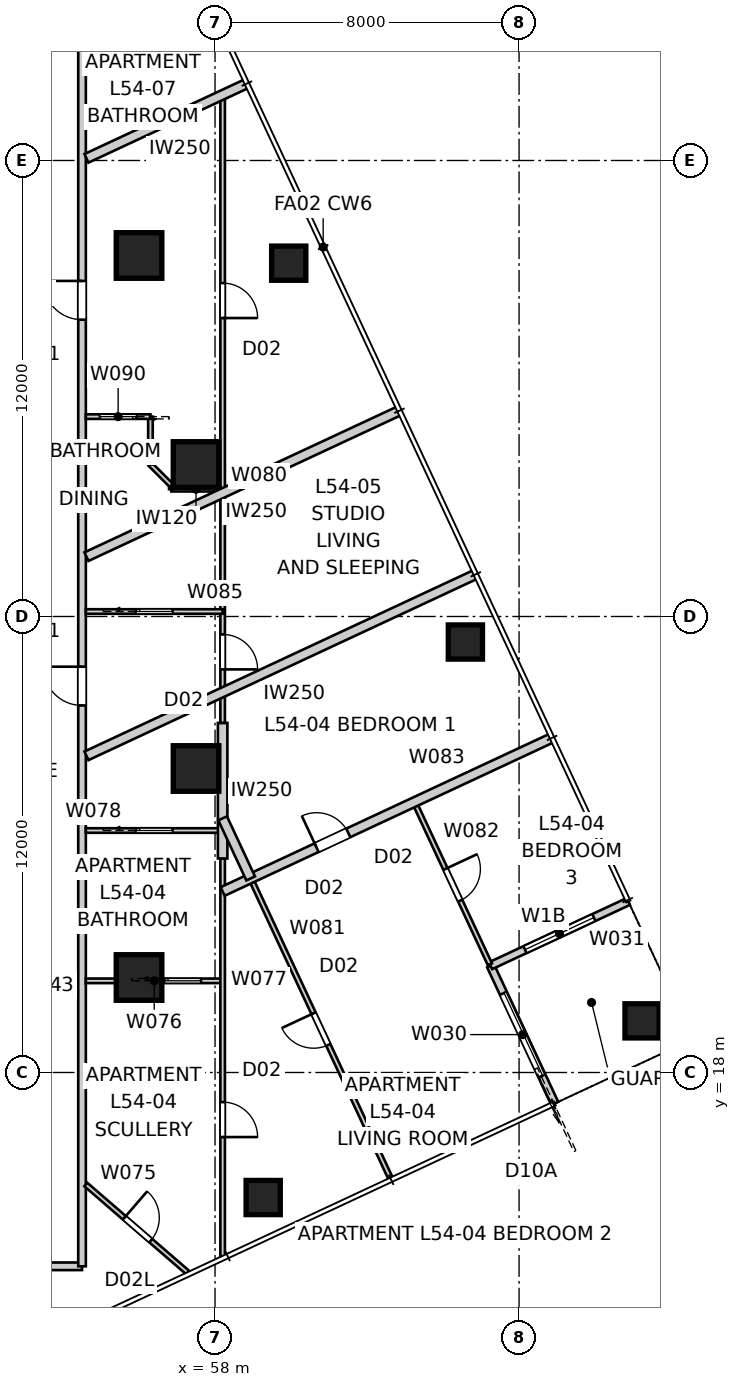
"""IFC4 building model, lengths in metres.
Left out: names, types, materials, properties, quantities, classifications, styles, units other than length and angle.
Written with IfcOpenShell. Run it as: python <this file> out.ifc"""

import sys

from ifc_helpers import new_model, si_unit, direction, frame, frame_2d, origin, origin_2d, place, context, subcontext, project, spatial, rectangle, extrude, element, fill, save


model = new_model("IFC4")
c1 = context("Model", 3, precision=1e-05, world=origin(), true_north=direction((0.0, 1.0)))
c2 = subcontext(c1, "Body", "Model", "MODEL_VIEW")
j1 = project(units=[si_unit("LENGTHUNIT", "METRE"), si_unit("PLANEANGLEUNIT", "RADIAN")], contexts=[c1])
p1 = place(None, origin())
s1 = spatial("IfcSite", under=j1, at=p1, CompositionType="ELEMENT")
p2 = place(p1, origin())
s2 = spatial("IfcBuilding", under=s1, at=p2, CompositionType="ELEMENT")
p3 = place(p2, frame((0.0, 0.0, 196.4)))
s3 = spatial("IfcBuildingStorey", under=s2, at=p3, CompositionType="ELEMENT", Elevation=196.4)
for number, where, z_axis, x_axis in (
    (1, (59.267, 14.71, 0.0), (0.0, 0.0, 1.0), (1.0, 0.0, 0.0)),
    (2, (69.236, 19.359, 0.0), (0.0, 0.0, 1.0), (1.0, 0.0, 0.0)),
    (3, (64.588, 29.328, 0.0), (0.0, 0.0, 1.0), (1.0, 0.0, 0.0)),
    (4, (59.939, 39.298, 0.0), (0.0, 0.0, 1.0), (1.0, 0.0, 0.0)),
):
    element("IfcColumn", number, at=place(p3, frame(where, z_axis=z_axis, x_axis=x_axis)), inside=s3, PredefinedType="COLUMN", context=c2, shape_type="SweptSolid", body=[
        extrude(rectangle(XDim=0.9, YDim=0.9, at=origin_2d()), origin(), (0.0, 0.0, 1.0), 3.4),
    ])
for number, where, z_axis, x_axis in (
    (5, (57.5, 26.0, 0.0), (0.0, 0.0, 1.0), (1.0, 0.0, 0.0)),
    (6, (57.5, 34.0, 0.0), (0.0, 0.0, 1.0), (1.0, 0.0, 0.0)),
    (7, (56.0, 39.5, 0.0), (0.0, 0.0, 1.0), (1.0, 0.0, 0.0)),
    (8, (56.0, 20.5, 0.0), (0.0, 0.0, 1.0), (1.0, 0.0, 0.0)),
):
    element("IfcColumn", number, at=place(p3, frame(where, z_axis=z_axis, x_axis=x_axis)), inside=s3, PredefinedType="COLUMN", context=c2, shape_type="SweptSolid", body=[
        extrude(rectangle(XDim=1.2, YDim=1.2, at=origin_2d()), origin(), (0.0, 0.0, 1.0), 3.4),
    ])
p4 = place(p3, frame((66.94, 17.185, 0.0), z_axis=(0.0, 0.0, 1.0), x_axis=(-0.422658246362, 0.906289140828, 0.0)))
e9 = element("IfcWall", 9, at=p4, inside=s3, PredefinedType="SOLIDWALL", context=c2, shape_type="SweptSolid", body=[
    extrude(rectangle(XDim=4.0, YDim=0.2, at=frame_2d((2.0, 0.0))), origin(), (0.0, 0.0, 1.0), 3.25),
])
p5 = place(p4, frame((0.8, 0.0, 0.0)))
e10 = element("IfcOpeningElement", 10, at=p5, cuts=e9, PredefinedType="OPENING", context=c2, shape_type="SweptSolid", body=[
    extrude(rectangle(XDim=2.4, YDim=2.1, at=frame_2d((1.2, 1.05))), frame((0.0, 0.11, 0.0), z_axis=(0.0, -1.0, 0.0), x_axis=(1.0, 0.0, 0.0)), (0.0, 0.0, 1.0), 0.22),
])
p6 = place(p3, frame((65.25, 20.81, 0.0), z_axis=(0.0, 0.0, 1.0), x_axis=(0.906289140828, 0.422658246362, 0.0)))
e11 = element("IfcWall", 11, at=p6, inside=s3, PredefinedType="SOLIDWALL", context=c2, shape_type="SweptSolid", body=[
    extrude(rectangle(XDim=4.0, YDim=0.2, at=frame_2d((2.0, 0.0))), origin(), (0.0, 0.0, 1.0), 3.25),
])
p7 = place(p6, frame((1.0, 0.0, 0.45)))
e12 = element("IfcOpeningElement", 12, at=p7, cuts=e11, PredefinedType="OPENING", context=c2, shape_type="SweptSolid", body=[
    extrude(rectangle(XDim=2.0, YDim=1.8, at=frame_2d((1.0, 0.9))), frame((0.0, 0.11, 0.0), z_axis=(0.0, -1.0, 0.0), x_axis=(1.0, 0.0, 0.0)), (0.0, 0.0, 1.0), 0.22),
])
p8 = place(p3, frame((46.308, 12.9, 0.0), z_axis=(0.0, 0.0, 1.0), x_axis=(1.0, 0.0, 0.0)))
e13 = element("IfcWall", 13, at=p8, inside=s3, PredefinedType="PARTITIONING", context=c2, shape_type="SweptSolid", body=[
    extrude(rectangle(XDim=8.192, YDim=0.2, at=frame_2d((4.096, 0.0))), origin(), (0.0, 0.0, 1.0), 3.25),
])
p9 = place(p8, frame((4.207, 0.0, 0.0)))
e14 = element("IfcOpeningElement", 14, at=p9, cuts=e13, PredefinedType="OPENING", context=c2, shape_type="SweptSolid", body=[
    extrude(rectangle(XDim=1.02, YDim=2.34, at=frame_2d((0.51, 1.17))), frame((0.0, 0.11, 0.0), z_axis=(0.0, -1.0, 0.0), x_axis=(1.0, 0.0, 0.0)), (0.0, 0.0, 1.0), 0.22),
])
p10 = place(p3, frame((54.5, 12.9, 0.0), z_axis=(0.0, 0.0, 1.0), x_axis=(0.0, 1.0, 0.0)))
e15 = element("IfcWall", 15, at=p10, inside=s3, PredefinedType="PARTITIONING", context=c2, shape_type="SweptSolid", body=[
    extrude(rectangle(XDim=33.8, YDim=0.2, at=frame_2d((16.9, 0.0))), origin(), (0.0, 0.0, 1.0), 3.25),
])
p11 = place(p10, frame((24.911, 0.0, 0.0)))
e16 = element("IfcOpeningElement", 16, at=p11, cuts=e15, PredefinedType="OPENING", context=c2, shape_type="SweptSolid", body=[
    extrude(rectangle(XDim=1.02, YDim=2.34, at=frame_2d((0.51, 1.17))), frame((0.0, 0.11, 0.0), z_axis=(0.0, -1.0, 0.0), x_axis=(1.0, 0.0, 0.0)), (0.0, 0.0, 1.0), 0.22),
])
p12 = place(p10, frame((14.759, 0.0, 0.0)))
e17 = element("IfcOpeningElement", 17, at=p12, cuts=e15, PredefinedType="OPENING", context=c2, shape_type="SweptSolid", body=[
    extrude(rectangle(XDim=1.02, YDim=2.34, at=frame_2d((0.51, 1.17))), frame((0.0, 0.11, 0.0), z_axis=(0.0, -1.0, 0.0), x_axis=(1.0, 0.0, 0.0)), (0.0, 0.0, 1.0), 0.22),
])
p13 = place(p3, frame((62.853, 35.415, 0.0), z_axis=(0.0, 0.0, 1.0), x_axis=(-0.90630664327, -0.422620714548, 0.0)))
e18 = element("IfcWall", 18, at=p13, inside=s3, PredefinedType="PARTITIONING", context=c2, shape_type="SweptSolid", body=[
    extrude(rectangle(XDim=9.088, YDim=0.25, at=frame_2d((4.544, 0.0))), origin(), (0.0, 0.0, 1.0), 3.25),
])
p14 = place(p3, frame((58.838, 44.025, 0.0), z_axis=(0.0, 0.0, 1.0), x_axis=(-0.906317010604, -0.422598481173, 0.0)))
e19 = element("IfcWall", 19, at=p14, inside=s3, PredefinedType="PARTITIONING", context=c2, shape_type="SweptSolid", body=[
    extrude(rectangle(XDim=4.657, YDim=0.25, at=frame_2d((2.329, 0.0))), origin(), (0.0, 0.0, 1.0), 3.25),
])
p15 = place(p3, frame((64.86, 31.11, 0.0), z_axis=(0.0, 0.0, 1.0), x_axis=(-0.906306714884, -0.422620560972, 0.0)))
e20 = element("IfcWall", 20, at=p15, inside=s3, PredefinedType="PARTITIONING", context=c2, shape_type="SweptSolid", body=[
    extrude(rectangle(XDim=11.302, YDim=0.25, at=frame_2d((5.651, 0.0))), origin(), (0.0, 0.0, 1.0), 3.25),
])
p16 = place(p3, frame((54.6, 15.052, 0.0), z_axis=(0.0, 0.0, 1.0), x_axis=(0.756558808476, -0.653925660391, 0.0)))
e21 = element("IfcWall", 21, at=p16, inside=s3, PredefinedType="PARTITIONING", context=c2, shape_type="SweptSolid", body=[
    extrude(rectangle(XDim=3.554, YDim=0.12, at=frame_2d((1.777, 0.0))), origin(), (0.0, 0.0, 1.0), 3.25),
])
p17 = place(p16, frame((1.339, 0.0, 0.0)))
e22 = element("IfcOpeningElement", 22, at=p17, cuts=e21, PredefinedType="OPENING", context=c2, shape_type="SweptSolid", body=[
    extrude(rectangle(XDim=0.92, YDim=2.1, at=frame_2d((0.46, 1.05))), frame((0.0, 0.07, 0.0), z_axis=(0.0, -1.0, 0.0), x_axis=(1.0, 0.0, 0.0)), (0.0, 0.0, 1.0), 0.14),
])
p18 = place(p3, frame((54.6, 20.413, 0.0), z_axis=(0.0, 0.0, 1.0), x_axis=(1.0, 0.0, 0.0)))
e23 = element("IfcWall", 23, at=p18, inside=s3, PredefinedType="PARTITIONING", context=c2, shape_type="SweptSolid", body=[
    extrude(rectangle(XDim=3.6, YDim=0.12, at=frame_2d((1.8, 0.0))), origin(), (0.0, 0.0, 1.0), 3.25),
])
p19 = place(p18, frame((2.07, 0.0, 0.0)))
e24 = element("IfcOpeningElement", 24, at=p19, cuts=e23, PredefinedType="OPENING", context=c2, shape_type="SweptSolid", body=[
    extrude(rectangle(XDim=0.96, YDim=2.1, at=frame_2d((0.48, 1.05))), frame((0.0, 0.07, 0.0), z_axis=(0.0, -1.0, 0.0), x_axis=(1.0, 0.0, 0.0)), (0.0, 0.0, 1.0), 0.14),
])
p20 = place(p3, frame((58.2, 23.632, 0.0), z_axis=(0.0, 0.0, 1.0), x_axis=(0.0, -1.0, 0.0)))
e25 = element("IfcWall", 25, at=p20, inside=s3, PredefinedType="PARTITIONING", context=c2, shape_type="SweptSolid", body=[
    extrude(rectangle(XDim=10.479, YDim=0.12, at=frame_2d((5.24, 0.0))), origin(), (0.0, 0.0, 1.0), 3.25),
])
p21 = place(p20, frame((6.411, 0.0, 0.0)))
e26 = element("IfcOpeningElement", 26, at=p21, cuts=e25, PredefinedType="OPENING", context=c2, shape_type="SweptSolid", body=[
    extrude(rectangle(XDim=0.92, YDim=2.34, at=frame_2d((0.46, 1.17))), frame((0.0, 0.07, 0.0), z_axis=(0.0, -1.0, 0.0), x_axis=(1.0, 0.0, 0.0)), (0.0, 0.0, 1.0), 0.14),
])
p22 = place(p3, frame((54.6, 24.368, 0.0), z_axis=(0.0, 0.0, 1.0), x_axis=(1.0, 0.0, 0.0)))
e27 = element("IfcWall", 27, at=p22, inside=s3, PredefinedType="PARTITIONING", context=c2, shape_type="SweptSolid", body=[
    extrude(rectangle(XDim=3.6, YDim=0.12, at=frame_2d((1.8, 0.0))), origin(), (0.0, 0.0, 1.0), 3.25),
])
p23 = place(p22, frame((1.32, 0.0, 0.0)))
e28 = element("IfcOpeningElement", 28, at=p23, cuts=e27, PredefinedType="OPENING", context=c2, shape_type="SweptSolid", body=[
    extrude(rectangle(XDim=0.96, YDim=2.1, at=frame_2d((0.48, 1.05))), frame((0.0, 0.07, 0.0), z_axis=(0.0, -1.0, 0.0), x_axis=(1.0, 0.0, 0.0)), (0.0, 0.0, 1.0), 0.14),
])
p24 = place(p3, frame((58.2, 27.2, 0.0), z_axis=(0.0, 0.0, 1.0), x_axis=(0.0, -1.0, 0.0)))
e29 = element("IfcWall", 29, at=p24, inside=s3, PredefinedType="PARTITIONING", context=c2, shape_type="SweptSolid", body=[
    extrude(rectangle(XDim=3.568, YDim=0.25, at=frame_2d((1.784, 0.0))), origin(), (0.0, 0.0, 1.0), 3.25),
])
p25 = place(p3, frame((58.2, 43.728, 0.0), z_axis=(0.0, 0.0, 1.0), x_axis=(0.0, -1.0, 0.0)))
e30 = element("IfcWall", 30, at=p25, inside=s3, PredefinedType="PARTITIONING", context=c2, shape_type="SweptSolid", body=[
    extrude(rectangle(XDim=16.528, YDim=0.12, at=frame_2d((8.264, 0.0))), origin(), (0.0, 0.0, 1.0), 3.25),
])
p26 = place(p25, frame((4.954, 0.0, 0.0)))
e31 = element("IfcOpeningElement", 31, at=p26, cuts=e30, PredefinedType="OPENING", context=c2, shape_type="SweptSolid", body=[
    extrude(rectangle(XDim=0.92, YDim=2.34, at=frame_2d((0.46, 1.17))), frame((0.0, 0.07, 0.0), z_axis=(0.0, -1.0, 0.0), x_axis=(1.0, 0.0, 0.0)), (0.0, 0.0, 1.0), 0.14),
])
p27 = place(p25, frame((14.2, 0.0, 0.0)))
e32 = element("IfcOpeningElement", 32, at=p27, cuts=e30, PredefinedType="OPENING", context=c2, shape_type="SweptSolid", body=[
    extrude(rectangle(XDim=0.92, YDim=2.34, at=frame_2d((0.46, 1.17))), frame((0.0, 0.07, 0.0), z_axis=(0.0, -1.0, 0.0), x_axis=(1.0, 0.0, 0.0)), (0.0, 0.0, 1.0), 0.14),
])
p28 = place(p3, frame((62.618, 15.213, 0.0), z_axis=(0.0, 0.0, 1.0), x_axis=(-0.422604635972, 0.906314140712, 0.0)))
e33 = element("IfcWall", 33, at=p28, inside=s3, PredefinedType="PARTITIONING", context=c2, shape_type="SweptSolid", body=[
    extrude(rectangle(XDim=8.71, YDim=0.12, at=frame_2d((4.355, 0.0))), origin(), (0.0, 0.0, 1.0), 3.25),
])
p29 = place(p28, frame((3.875, 0.0, 0.0)))
e34 = element("IfcOpeningElement", 34, at=p29, cuts=e33, PredefinedType="OPENING", context=c2, shape_type="SweptSolid", body=[
    extrude(rectangle(XDim=0.92, YDim=2.34, at=frame_2d((0.46, 1.17))), frame((0.0, 0.07, 0.0), z_axis=(0.0, -1.0, 0.0), x_axis=(1.0, 0.0, 0.0)), (0.0, 0.0, 1.0), 0.14),
])
p30 = place(p3, frame((63.242, 25.115, 0.0), z_axis=(0.0, 0.0, 1.0), x_axis=(0.422601682441, -0.906315517906, 0.0)))
e35 = element("IfcWall", 35, at=p30, inside=s3, PredefinedType="PARTITIONING", context=c2, shape_type="SweptSolid", body=[
    extrude(rectangle(XDim=4.71, YDim=0.12, at=frame_2d((2.355, 0.0))), origin(), (0.0, 0.0, 1.0), 3.25),
])
p31 = place(p30, frame((1.94, 0.0, 0.0)))
e36 = element("IfcOpeningElement", 36, at=p31, cuts=e35, PredefinedType="OPENING", context=c2, shape_type="SweptSolid", body=[
    extrude(rectangle(XDim=0.92, YDim=2.34, at=frame_2d((0.46, 1.17))), frame((0.0, 0.07, 0.0), z_axis=(0.0, -1.0, 0.0), x_axis=(1.0, 0.0, 0.0)), (0.0, 0.0, 1.0), 0.14),
])
p32 = place(p3, frame((58.2, 22.764, 0.0), z_axis=(0.0, 0.0, 1.0), x_axis=(0.906301646474, 0.422631429971, 0.0)))
e37 = element("IfcWall", 37, at=p32, inside=s3, PredefinedType="PARTITIONING", context=c2, shape_type="SweptSolid", body=[
    extrude(rectangle(XDim=9.523, YDim=0.25, at=frame_2d((4.762, 0.0))), origin(), (0.0, 0.0, 1.0), 3.25),
])
p33 = place(p32, frame((2.729, 0.0, 0.0)))
e38 = element("IfcOpeningElement", 38, at=p33, cuts=e37, PredefinedType="OPENING", context=c2, shape_type="SweptSolid", body=[
    extrude(rectangle(XDim=0.92, YDim=2.34, at=frame_2d((0.46, 1.17))), frame((0.0, 0.135, 0.0), z_axis=(0.0, -1.0, 0.0), x_axis=(1.0, 0.0, 0.0)), (0.0, 0.0, 1.0), 0.27),
])
p34 = place(p3, frame((58.937, 23.107, 0.0), z_axis=(0.0, 0.0, 1.0), x_axis=(-0.422640287026, 0.906297516152, 0.0)))
e39 = element("IfcWall", 39, at=p34, inside=s3, PredefinedType="PARTITIONING", context=c2, shape_type="SweptSolid", body=[
    extrude(rectangle(XDim=1.745, YDim=0.25, at=frame_2d((0.872, 0.0))), origin(), (0.0, 0.0, 1.0), 3.25),
])
p35 = place(p3, frame((54.6, 30.131, 0.0), z_axis=(0.0, 0.0, 1.0), x_axis=(1.0, 0.0, 0.0)))
e40 = element("IfcWall", 40, at=p35, inside=s3, PredefinedType="PARTITIONING", context=c2, shape_type="SweptSolid", body=[
    extrude(rectangle(XDim=3.6, YDim=0.12, at=frame_2d((1.8, 0.0))), origin(), (0.0, 0.0, 1.0), 3.25),
])
p36 = place(p35, frame((1.32, 0.0, 0.0)))
e41 = element("IfcOpeningElement", 41, at=p36, cuts=e40, PredefinedType="OPENING", context=c2, shape_type="SweptSolid", body=[
    extrude(rectangle(XDim=0.96, YDim=2.1, at=frame_2d((0.48, 1.05))), frame((0.0, 0.07, 0.0), z_axis=(0.0, -1.0, 0.0), x_axis=(1.0, 0.0, 0.0)), (0.0, 0.0, 1.0), 0.14),
])
p37 = place(p3, frame((58.15, 33.35, 0.0), z_axis=(0.0, 0.0, 1.0), x_axis=(-1.0, 0.0, 0.0)))
e42 = element("IfcWall", 42, at=p37, inside=s3, PredefinedType="PARTITIONING", context=c2, shape_type="SweptSolid", body=[
    extrude(rectangle(XDim=1.3, YDim=0.12, at=frame_2d((0.65, 0.0))), origin(), (0.0, 0.0, 1.0), 3.25),
])
p38 = place(p3, frame((56.85, 33.45, 0.0), z_axis=(0.0, 0.0, 1.0), x_axis=(-0.707106781187, 0.707106781187, 0.0)))
e43 = element("IfcWall", 43, at=p38, inside=s3, PredefinedType="PARTITIONING", context=c2, shape_type="SweptSolid", body=[
    extrude(rectangle(XDim=0.778, YDim=0.12, at=frame_2d((0.389, 0.0))), origin(), (0.0, 0.0, 1.0), 3.25),
])
p39 = place(p3, frame((56.3, 34.0, 0.0), z_axis=(0.0, 0.0, 1.0), x_axis=(0.0, 1.0, 0.0)))
e44 = element("IfcWall", 44, at=p39, inside=s3, PredefinedType="PARTITIONING", context=c2, shape_type="SweptSolid", body=[
    extrude(rectangle(XDim=1.26, YDim=0.12, at=frame_2d((0.63, 0.0))), origin(), (0.0, 0.0, 1.0), 3.25),
])
p40 = place(p3, frame((56.3, 35.26, 0.0), z_axis=(0.0, 0.0, 1.0), x_axis=(-1.0, 0.0, 0.0)))
e45 = element("IfcWall", 45, at=p40, inside=s3, PredefinedType="PARTITIONING", context=c2, shape_type="SweptSolid", body=[
    extrude(rectangle(XDim=1.7, YDim=0.12, at=frame_2d((0.85, 0.0))), origin(), (0.0, 0.0, 1.0), 3.25),
])
p41 = place(p40, frame((0.37, 0.0, 0.0)))
e46 = element("IfcOpeningElement", 46, at=p41, cuts=e45, PredefinedType="OPENING", context=c2, shape_type="SweptSolid", body=[
    extrude(rectangle(XDim=0.96, YDim=2.1, at=frame_2d((0.48, 1.05))), frame((0.0, 0.07, 0.0), z_axis=(0.0, -1.0, 0.0), x_axis=(1.0, 0.0, 0.0)), (0.0, 0.0, 1.0), 0.14),
])
p42 = place(p3, frame((56.85, 33.35, 0.0), z_axis=(0.0, 0.0, 1.0), x_axis=(0.0, 1.0, 0.0)))
e47 = element("IfcWall", 47, at=p42, inside=s3, PredefinedType="PARTITIONING", context=c2, shape_type="SweptSolid", body=[
    extrude(rectangle(XDim=0.1, YDim=0.12, at=frame_2d((0.05, 0.0))), origin(), (0.0, 0.0, 1.0), 3.25),
])
p43 = place(p5, origin())
e48 = element("IfcDoor", 48, at=p43, inside=s3, OperationType="SLIDING_TO_LEFT", PredefinedType="DOOR", context=c2, shape_type="SweptSolid", body=[
    extrude(rectangle(XDim=2.4, YDim=2.1, at=frame_2d((1.2, 1.05))), frame((0.0, 0.025, 0.0), z_axis=(0.0, -1.0, 0.0), x_axis=(1.0, 0.0, 0.0)), (0.0, 0.0, 1.0), 0.05),
])
fill(e10, e48)
p44 = place(p7, origin())
e49 = element("IfcWindow", 49, at=p44, inside=s3, PartitioningType="SINGLE_PANEL", PredefinedType="WINDOW", context=c2, shape_type="SweptSolid", body=[
    extrude(rectangle(XDim=2.0, YDim=1.8, at=frame_2d((1.0, 0.9))), frame((0.0, 0.03, 0.0), z_axis=(0.0, -1.0, 0.0), x_axis=(1.0, 0.0, 0.0)), (0.0, 0.0, 1.0), 0.06),
])
fill(e12, e49)
p45 = place(p11, origin())
e50 = element("IfcDoor", 50, at=p45, inside=s3, OperationType="SINGLE_SWING_RIGHT", PredefinedType="DOOR", context=c2, shape_type="SweptSolid", body=[
    extrude(rectangle(XDim=1.02, YDim=2.34, at=frame_2d((0.51, 1.17))), frame((0.0, 0.025, 0.0), z_axis=(0.0, -1.0, 0.0), x_axis=(1.0, 0.0, 0.0)), (0.0, 0.0, 1.0), 0.05),
])
fill(e16, e50)
p46 = place(p12, origin())
e51 = element("IfcDoor", 51, at=p46, inside=s3, OperationType="SINGLE_SWING_RIGHT", PredefinedType="DOOR", context=c2, shape_type="SweptSolid", body=[
    extrude(rectangle(XDim=1.02, YDim=2.34, at=frame_2d((0.51, 1.17))), frame((0.0, 0.025, 0.0), z_axis=(0.0, -1.0, 0.0), x_axis=(1.0, 0.0, 0.0)), (0.0, 0.0, 1.0), 0.05),
])
fill(e17, e51)
p47 = place(p26, origin())
e52 = element("IfcDoor", 52, at=p47, inside=s3, OperationType="SINGLE_SWING_RIGHT", PredefinedType="DOOR", context=c2, shape_type="SweptSolid", body=[
    extrude(rectangle(XDim=0.92, YDim=2.34, at=frame_2d((0.46, 1.17))), frame((0.0, 0.025, 0.0), z_axis=(0.0, -1.0, 0.0), x_axis=(1.0, 0.0, 0.0)), (0.0, 0.0, 1.0), 0.05),
])
fill(e31, e52)
p48 = place(p41, origin())
e53 = element("IfcDoor", 53, at=p48, inside=s3, OperationType="SLIDING_TO_LEFT", PredefinedType="DOOR", context=c2, shape_type="SweptSolid", body=[
    extrude(rectangle(XDim=0.96, YDim=2.1, at=frame_2d((0.48, 1.05))), frame((0.0, 0.025, 0.0), z_axis=(0.0, -1.0, 0.0), x_axis=(1.0, 0.0, 0.0)), (0.0, 0.0, 1.0), 0.05),
])
fill(e46, e53)
p49 = place(p17, origin())
e54 = element("IfcDoor", 54, at=p49, inside=s3, OperationType="SINGLE_SWING_LEFT", PredefinedType="DOOR", context=c2, shape_type="SweptSolid", body=[
    extrude(rectangle(XDim=0.92, YDim=2.1, at=frame_2d((0.46, 1.05))), frame((0.0, 0.025, 0.0), z_axis=(0.0, -1.0, 0.0), x_axis=(1.0, 0.0, 0.0)), (0.0, 0.0, 1.0), 0.05),
])
fill(e22, e54)
p50 = place(p36, origin())
e55 = element("IfcDoor", 55, at=p50, inside=s3, OperationType="SLIDING_TO_LEFT", PredefinedType="DOOR", context=c2, shape_type="SweptSolid", body=[
    extrude(rectangle(XDim=0.96, YDim=2.1, at=frame_2d((0.48, 1.05))), frame((0.0, 0.025, 0.0), z_axis=(0.0, -1.0, 0.0), x_axis=(1.0, 0.0, 0.0)), (0.0, 0.0, 1.0), 0.05),
])
fill(e41, e55)
p51 = place(p27, origin())
e56 = element("IfcDoor", 56, at=p51, inside=s3, OperationType="SINGLE_SWING_RIGHT", PredefinedType="DOOR", context=c2, shape_type="SweptSolid", body=[
    extrude(rectangle(XDim=0.92, YDim=2.34, at=frame_2d((0.46, 1.17))), frame((0.0, 0.025, 0.0), z_axis=(0.0, -1.0, 0.0), x_axis=(1.0, 0.0, 0.0)), (0.0, 0.0, 1.0), 0.05),
])
fill(e32, e56)
p52 = place(p21, origin())
e57 = element("IfcDoor", 57, at=p52, inside=s3, OperationType="SINGLE_SWING_RIGHT", PredefinedType="DOOR", context=c2, shape_type="SweptSolid", body=[
    extrude(rectangle(XDim=0.92, YDim=2.34, at=frame_2d((0.46, 1.17))), frame((0.0, 0.025, 0.0), z_axis=(0.0, -1.0, 0.0), x_axis=(1.0, 0.0, 0.0)), (0.0, 0.0, 1.0), 0.05),
])
fill(e26, e57)
p53 = place(p19, origin())
e58 = element("IfcDoor", 58, at=p53, inside=s3, OperationType="SLIDING_TO_LEFT", PredefinedType="DOOR", context=c2, shape_type="SweptSolid", body=[
    extrude(rectangle(XDim=0.96, YDim=2.1, at=frame_2d((0.48, 1.05))), frame((0.0, 0.025, 0.0), z_axis=(0.0, -1.0, 0.0), x_axis=(1.0, 0.0, 0.0)), (0.0, 0.0, 1.0), 0.05),
])
fill(e24, e58)
p54 = place(p23, origin())
e59 = element("IfcDoor", 59, at=p54, inside=s3, OperationType="SLIDING_TO_LEFT", PredefinedType="DOOR", context=c2, shape_type="SweptSolid", body=[
    extrude(rectangle(XDim=0.96, YDim=2.1, at=frame_2d((0.48, 1.05))), frame((0.0, 0.025, 0.0), z_axis=(0.0, -1.0, 0.0), x_axis=(1.0, 0.0, 0.0)), (0.0, 0.0, 1.0), 0.05),
])
fill(e28, e59)
p55 = place(p29, origin())
e60 = element("IfcDoor", 60, at=p55, inside=s3, OperationType="SINGLE_SWING_RIGHT", PredefinedType="DOOR", context=c2, shape_type="SweptSolid", body=[
    extrude(rectangle(XDim=0.92, YDim=2.34, at=frame_2d((0.46, 1.17))), frame((0.0, 0.025, 0.0), z_axis=(0.0, -1.0, 0.0), x_axis=(1.0, 0.0, 0.0)), (0.0, 0.0, 1.0), 0.05),
])
fill(e34, e60)
p56 = place(p31, origin())
e61 = element("IfcDoor", 61, at=p56, inside=s3, OperationType="SINGLE_SWING_LEFT", PredefinedType="DOOR", context=c2, shape_type="SweptSolid", body=[
    extrude(rectangle(XDim=0.92, YDim=2.34, at=frame_2d((0.46, 1.17))), frame((0.0, 0.025, 0.0), z_axis=(0.0, -1.0, 0.0), x_axis=(1.0, 0.0, 0.0)), (0.0, 0.0, 1.0), 0.05),
])
fill(e36, e61)
p57 = place(p33, origin())
e62 = element("IfcDoor", 62, at=p57, inside=s3, OperationType="SINGLE_SWING_LEFT", PredefinedType="DOOR", context=c2, shape_type="SweptSolid", body=[
    extrude(rectangle(XDim=0.92, YDim=2.34, at=frame_2d((0.46, 1.17))), frame((0.0, 0.025, 0.0), z_axis=(0.0, -1.0, 0.0), x_axis=(1.0, 0.0, 0.0)), (0.0, 0.0, 1.0), 0.05),
])
fill(e38, e62)
save(model, sys.argv[1])
